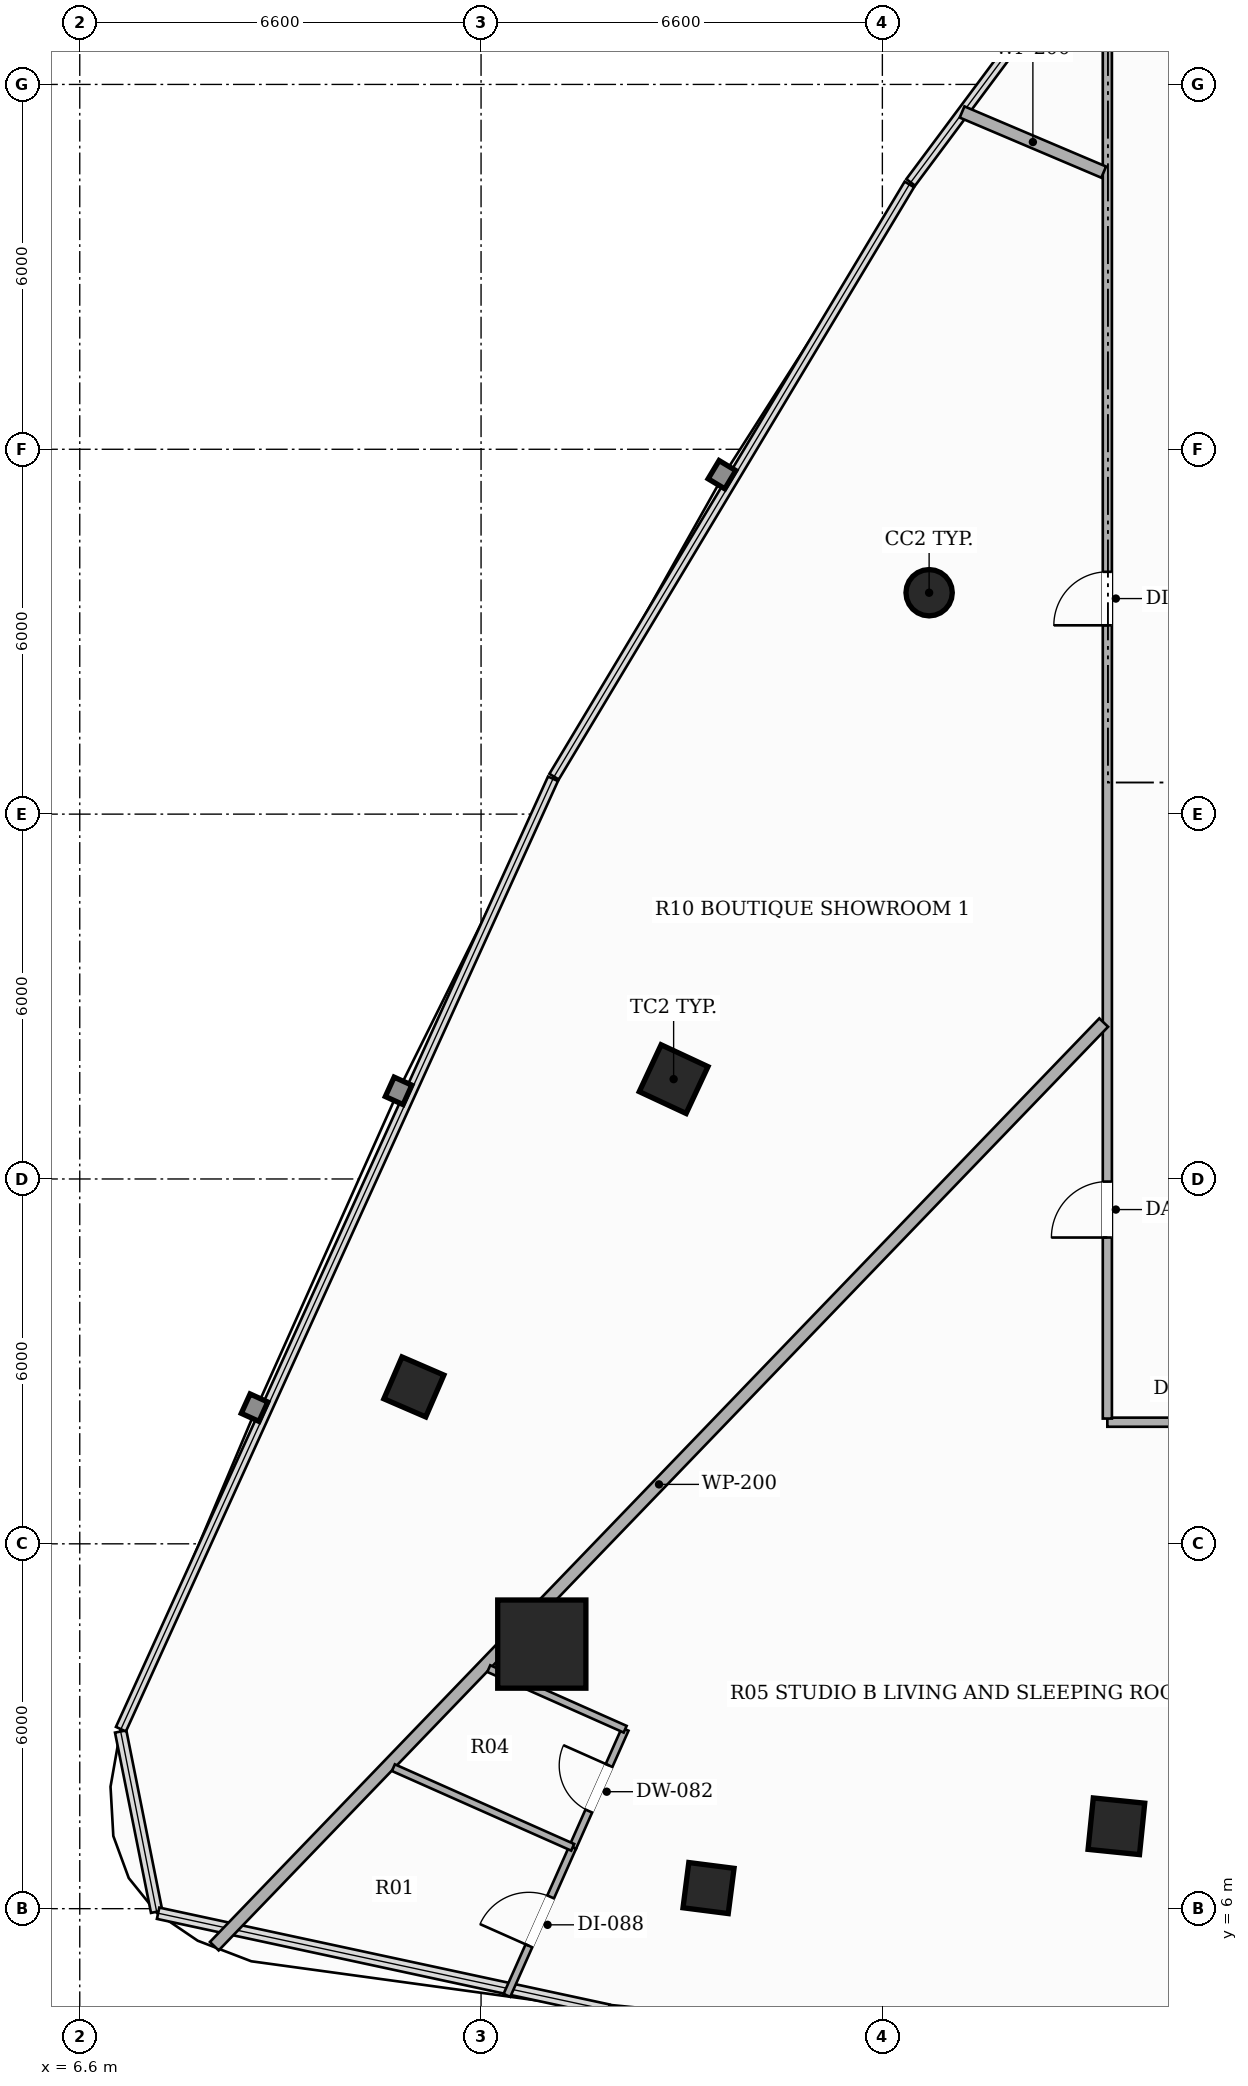
"""IFC4 building model, lengths in metres.
Left out: names, types, materials, properties, quantities, classifications, styles, units other than length and angle.
Written with IfcOpenShell. Run it as: python <this file> out.ifc"""

import sys

from ifc_helpers import new_model, si_unit, direction, frame, frame_2d, origin, origin_2d, place, context, subcontext, project, spatial, rectangle, hollow_rectangle, hollow_circle, extrude, element, fill, save


model = new_model("IFC4")
c1 = context("Model", 3, precision=1e-05, world=origin(), true_north=direction((0.0, 1.0)))
c2 = subcontext(c1, "Body", "Model", "MODEL_VIEW")
j1 = project(units=[si_unit("LENGTHUNIT", "METRE"), si_unit("PLANEANGLEUNIT", "RADIAN")], contexts=[c1])
p1 = place(None, origin())
s1 = spatial("IfcSite", under=j1, at=p1, CompositionType="ELEMENT")
p2 = place(p1, origin())
s2 = spatial("IfcBuilding", under=s1, at=p2, CompositionType="ELEMENT")
p3 = place(p2, frame((0.0, 0.0, 133.1)))
s3 = spatial("IfcBuildingStorey", under=s2, at=p3, CompositionType="ELEMENT", Elevation=133.1)
p4 = place(p3, frame((14.199, 10.351, 0.0), z_axis=(0.0, 0.0, 1.0), x_axis=(1.0, 0.0, 0.0)))
e1 = element("IfcColumn", 1, at=p4, inside=s3, PredefinedType="COLUMN", context=c2, shape_type="SweptSolid", body=[
    extrude(hollow_rectangle(XDim=1.45, YDim=1.45, WallThickness=0.045, at=origin_2d()), origin(), (0.0, 0.0, 1.0), 3.3),
])
p5 = place(p3, frame((20.569, 27.641, 0.0), z_axis=(0.0, 0.0, 1.0), x_axis=(1.0, 0.0, 0.0)))
e2 = element("IfcColumn", 2, at=p5, inside=s3, PredefinedType="COLUMN", context=c2, shape_type="SweptSolid", body=[
    extrude(hollow_circle(Radius=0.381, WallThickness=0.022, at=origin_2d()), origin(), (0.0, 0.0, 1.0), 3.3),
])
for number, where, z_axis, x_axis in (
    (3, (16.367, 19.642, 0.0), (0.0, 0.0, 1.0), (0.423, 0.906, 0.0)),
    (4, (23.649, 7.355, 0.0), (0.0, 0.0, 1.0), (-0.995, 0.101, 0.0)),
):
    element("IfcColumn", number, at=place(p3, frame(where, z_axis=z_axis, x_axis=x_axis)), inside=s3, PredefinedType="COLUMN", context=c2, shape_type="SweptSolid", body=[
        extrude(hollow_rectangle(XDim=0.85, YDim=0.85, WallThickness=0.028, at=origin_2d()), origin(), (0.0, 0.0, 1.0), 3.3),
    ])
for number, where, z_axis, x_axis in (
    (5, (12.095, 14.58, 0.0), (0.0, 0.0, 1.0), (0.397, 0.918, 0.0)),
    (6, (16.941, 6.339, 0.0), (0.0, 0.0, 1.0), (-0.992, 0.127, 0.0)),
):
    element("IfcColumn", number, at=place(p3, frame(where, z_axis=z_axis, x_axis=x_axis)), inside=s3, PredefinedType="COLUMN", context=c2, shape_type="SweptSolid", body=[
        extrude(hollow_rectangle(XDim=0.75, YDim=0.75, WallThickness=0.025, at=origin_2d()), origin(), (0.0, 0.0, 1.0), 3.3),
    ])
p6 = place(p3, frame((26.09, 14.0, 0.0), z_axis=(0.0, 0.0, 1.0), x_axis=(-1.0, 0.0, 0.0)))
e7 = element("IfcWall", 7, at=p6, inside=s3, PredefinedType="PARTITIONING", context=c2, shape_type="SweptSolid", body=[
    extrude(rectangle(XDim=2.59, YDim=0.15, at=frame_2d((1.295, 0.0))), origin(), (0.0, 0.0, 1.0), 2.721),
])
p7 = place(p3, frame((23.5, 14.06, 0.0), z_axis=(0.0, 0.0, 1.0), x_axis=(0.0, 1.0, 0.0)))
e8 = element("IfcWall", 8, at=p7, inside=s3, PredefinedType="PARTITIONING", context=c2, shape_type="SweptSolid", body=[
    extrude(rectangle(XDim=22.84, YDim=0.15, at=frame_2d((11.42, 0.0))), origin(), (0.0, 0.0, 1.0), 2.413),
])
p8 = place(p7, frame((13.045, 0.0, 0.0)))
e9 = element("IfcOpeningElement", 9, at=p8, cuts=e8, PredefinedType="OPENING", context=c2, shape_type="SweptSolid", body=[
    extrude(rectangle(XDim=0.88, YDim=2.1, at=frame_2d((0.44, 1.05))), frame((0.0, 0.085, 0.0), z_axis=(0.0, -1.0, 0.0), x_axis=(1.0, 0.0, 0.0)), (0.0, 0.0, 1.0), 0.17),
])
p9 = place(p7, frame((2.977, 0.0, 0.0)))
e10 = element("IfcOpeningElement", 10, at=p9, cuts=e8, PredefinedType="OPENING", context=c2, shape_type="SweptSolid", body=[
    extrude(rectangle(XDim=0.92, YDim=2.15, at=frame_2d((0.46, 1.075))), frame((0.0, 0.085, 0.0), z_axis=(0.0, -1.0, 0.0), x_axis=(1.0, 0.0, 0.0)), (0.0, 0.0, 1.0), 0.17),
])
p10 = place(p3, frame((23.44, 20.572, 0.0), z_axis=(0.0, 0.0, 1.0), x_axis=(-0.693655036552, -0.720307358193, 0.0)))
e11 = element("IfcWall", 11, at=p10, inside=s3, PredefinedType="PARTITIONING", context=c2, shape_type="SweptSolid", body=[
    extrude(rectangle(XDim=21.087, YDim=0.2, at=frame_2d((10.543, 0.0))), origin(), (0.0, 0.0, 1.0), 2.413),
])
p11 = place(p3, frame((21.111, 35.547, 0.0), z_axis=(0.0, 0.0, 1.0), x_axis=(0.920437694564, -0.390889307126, 0.0)))
e12 = element("IfcWall", 12, at=p11, inside=s3, PredefinedType="PARTITIONING", context=c2, shape_type="SweptSolid", body=[
    extrude(rectangle(XDim=2.53, YDim=0.2, at=frame_2d((1.265, 0.0))), origin(), (0.0, 0.0, 1.0), 3.06),
])
p12 = place(p3, frame((14.707, 7.009, 0.0), z_axis=(0.0, 0.0, 1.0), x_axis=(0.406127806348, 0.913816286193, 0.0)))
e13 = element("IfcWall", 13, at=p12, inside=s3, PredefinedType="PARTITIONING", context=c2, shape_type="SweptSolid", body=[
    extrude(rectangle(XDim=2.125, YDim=0.12, at=frame_2d((1.062, 0.0))), origin(), (0.0, 0.0, 1.0), 2.413),
])
p13 = place(p12, frame((0.653, 0.0, 0.0)))
e14 = element("IfcOpeningElement", 14, at=p13, cuts=e13, PredefinedType="OPENING", context=c2, shape_type="SweptSolid", body=[
    extrude(rectangle(XDim=0.82, YDim=2.1, at=frame_2d((0.41, 1.05))), frame((0.0, 0.07, 0.0), z_axis=(0.0, -1.0, 0.0), x_axis=(1.0, 0.0, 0.0)), (0.0, 0.0, 1.0), 0.14),
])
p14 = place(p3, frame((15.57, 8.951, 0.0), z_axis=(0.0, 0.0, 1.0), x_axis=(-0.91379514288, 0.406175376961, 0.0)))
e15 = element("IfcWall", 15, at=p14, inside=s3, PredefinedType="PARTITIONING", context=c2, shape_type="SweptSolid", body=[
    extrude(rectangle(XDim=2.455, YDim=0.12, at=frame_2d((1.228, 0.0))), origin(), (0.0, 0.0, 1.0), 2.413),
])
p15 = place(p3, frame((13.625, 4.574, 0.0), z_axis=(0.0, 0.0, 1.0), x_axis=(0.406070456553, 0.913841772034, 0.0)))
e16 = element("IfcWall", 16, at=p15, inside=s3, PredefinedType="PARTITIONING", context=c2, shape_type="SweptSolid", body=[
    extrude(rectangle(XDim=2.665, YDim=0.12, at=frame_2d((1.332, 0.0))), origin(), (0.0, 0.0, 1.0), 3.06),
])
p16 = place(p15, frame((0.892, 0.0, 0.0)))
e17 = element("IfcOpeningElement", 17, at=p16, cuts=e16, PredefinedType="OPENING", context=c2, shape_type="SweptSolid", body=[
    extrude(rectangle(XDim=0.88, YDim=2.1, at=frame_2d((0.44, 1.05))), frame((0.0, 0.07, 0.0), z_axis=(0.0, -1.0, 0.0), x_axis=(1.0, 0.0, 0.0)), (0.0, 0.0, 1.0), 0.14),
])
p17 = place(p3, frame((14.707, 7.009, 0.0), z_axis=(0.0, 0.0, 1.0), x_axis=(-0.913880174296, 0.40598402312, 0.0)))
e18 = element("IfcWall", 18, at=p17, inside=s3, PredefinedType="PARTITIONING", context=c2, shape_type="SweptSolid", body=[
    extrude(rectangle(XDim=3.227, YDim=0.12, at=frame_2d((1.613, 0.0))), origin(), (0.0, 0.0, 1.0), 3.06),
])
p18 = place(p8, origin())
e19 = element("IfcDoor", 19, at=p18, inside=s3, OperationType="SINGLE_SWING_LEFT", PredefinedType="DOOR", context=c2, shape_type="SweptSolid", body=[
    extrude(rectangle(XDim=0.88, YDim=2.1, at=frame_2d((0.44, 1.05))), frame((0.0, 0.025, 0.0), z_axis=(0.0, -1.0, 0.0), x_axis=(1.0, 0.0, 0.0)), (0.0, 0.0, 1.0), 0.05),
])
fill(e9, e19)
p19 = place(p9, origin())
e20 = element("IfcDoor", 20, at=p19, inside=s3, OperationType="SINGLE_SWING_LEFT", PredefinedType="DOOR", context=c2, shape_type="SweptSolid", body=[
    extrude(rectangle(XDim=0.92, YDim=2.15, at=frame_2d((0.46, 1.075))), frame((0.0, 0.025, 0.0), z_axis=(0.0, -1.0, 0.0), x_axis=(1.0, 0.0, 0.0)), (0.0, 0.0, 1.0), 0.05),
])
fill(e10, e20)
p20 = place(p13, origin())
e21 = element("IfcDoor", 21, at=p20, inside=s3, OperationType="SINGLE_SWING_RIGHT", PredefinedType="DOOR", context=c2, shape_type="SweptSolid", body=[
    extrude(rectangle(XDim=0.82, YDim=2.1, at=frame_2d((0.41, 1.05))), frame((0.0, 0.025, 0.0), z_axis=(0.0, -1.0, 0.0), x_axis=(1.0, 0.0, 0.0)), (0.0, 0.0, 1.0), 0.05),
])
fill(e14, e21)
p21 = place(p16, origin())
e22 = element("IfcDoor", 22, at=p21, inside=s3, OperationType="SINGLE_SWING_LEFT", PredefinedType="DOOR", context=c2, shape_type="SweptSolid", body=[
    extrude(rectangle(XDim=0.88, YDim=2.1, at=frame_2d((0.44, 1.05))), frame((0.0, 0.025, 0.0), z_axis=(0.0, -1.0, 0.0), x_axis=(1.0, 0.0, 0.0)), (0.0, 0.0, 1.0), 0.05),
])
fill(e17, e22)
save(model, sys.argv[1])
